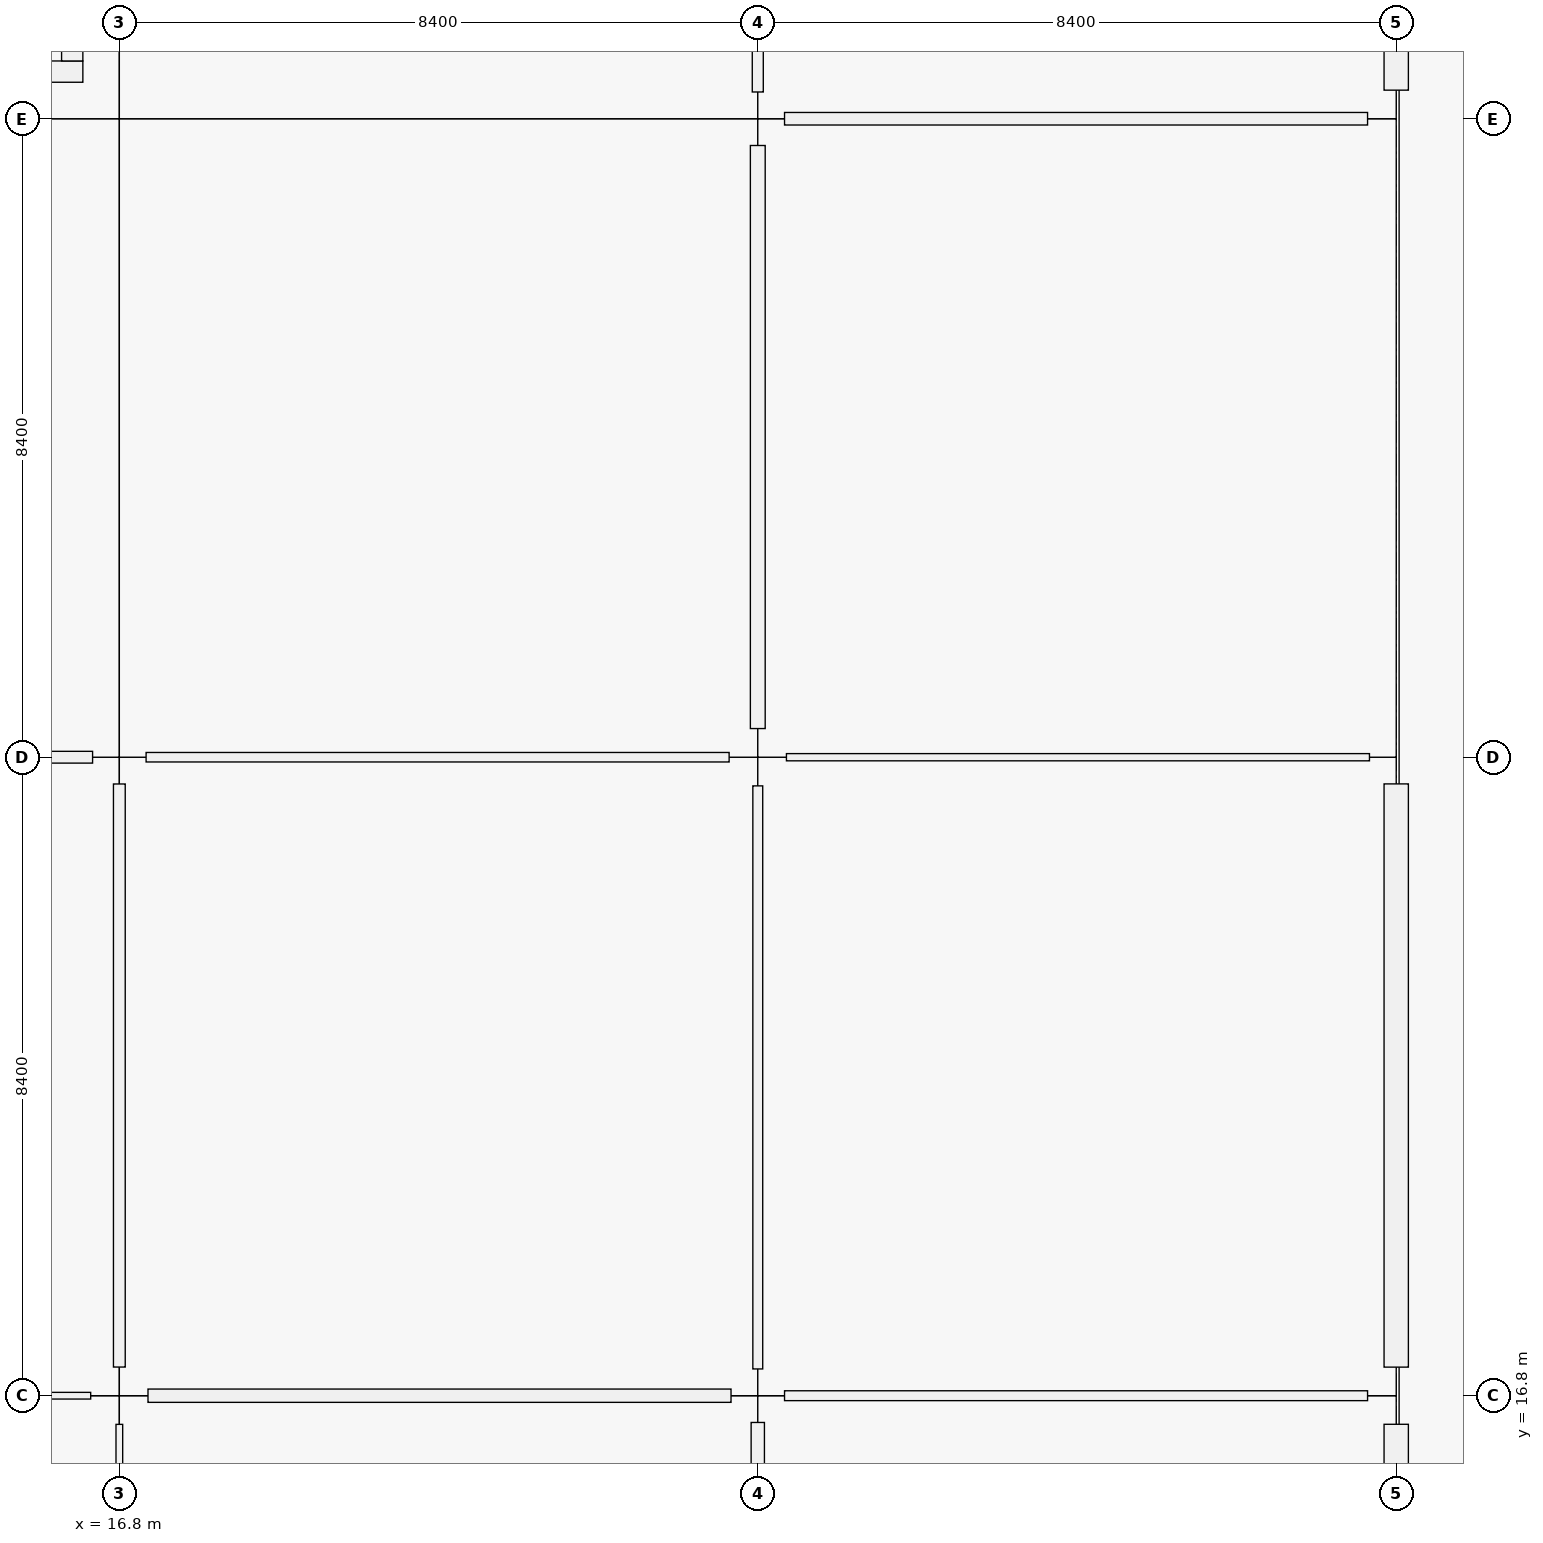
"""IFC4 building model, lengths in metres.
Left out: names, types, materials, properties, quantities, classifications, styles, units other than length and angle.
Written with IfcOpenShell. Run it as: python <this file> out.ifc"""

import sys

from ifc_helpers import new_model, si_unit, direction, frame, frame_2d, origin, origin_2d, place, context, subcontext, project, spatial, rectangle, extrude, element, fill, save


model = new_model("IFC4")
c1 = context("Model", 3, precision=1e-05, world=origin(), true_north=direction((0.0, 1.0)))
c2 = subcontext(c1, "Body", "Model", "MODEL_VIEW")
j1 = project(units=[si_unit("LENGTHUNIT", "METRE"), si_unit("PLANEANGLEUNIT", "RADIAN")], contexts=[c1])
p1 = place(None, origin())
s1 = spatial("IfcSite", under=j1, at=p1, CompositionType="ELEMENT")
p2 = place(p1, origin())
s2 = spatial("IfcBuilding", under=s1, at=p2, CompositionType="ELEMENT")
p3 = place(p2, frame((0.0, 0.0, 10.26)))
s3 = spatial("IfcBuildingStorey", under=s2, at=p3, CompositionType="ELEMENT", Elevation=10.26)
p4 = place(p3, frame((16.8, 16.8, 0.0), z_axis=(0.0, 0.0, 1.0), x_axis=(1.0, 0.0, 0.0)))
e1 = element("IfcColumn", 1, at=p4, inside=s3, PredefinedType="COLUMN", context=c2, shape_type="SweptSolid", body=[
    extrude(rectangle(XDim=0.75, YDim=0.75, at=origin_2d()), origin(), (0.0, 0.0, 1.0), 4.5),
])
p5 = place(p3, frame((16.8, 25.2, 0.0), z_axis=(0.0, 0.0, 1.0), x_axis=(1.0, 0.0, 0.0)))
e2 = element("IfcColumn", 2, at=p5, inside=s3, PredefinedType="COLUMN", context=c2, shape_type="SweptSolid", body=[
    extrude(rectangle(XDim=0.7, YDim=0.7, at=origin_2d()), origin(), (0.0, 0.0, 1.0), 4.5),
])
p6 = place(p3, frame((16.8, 33.6, 0.0), z_axis=(0.0, 0.0, 1.0), x_axis=(1.0, 0.0, 0.0)))
e3 = element("IfcColumn", 3, at=p6, inside=s3, PredefinedType="COLUMN", context=c2, shape_type="SweptSolid", body=[
    extrude(rectangle(XDim=0.75, YDim=0.75, at=origin_2d()), origin(), (0.0, 0.0, 1.0), 4.5),
])
p7 = place(p3, frame((25.2, 16.8, 0.0), z_axis=(0.0, 0.0, 1.0), x_axis=(1.0, 0.0, 0.0)))
e4 = element("IfcColumn", 4, at=p7, inside=s3, PredefinedType="COLUMN", context=c2, shape_type="SweptSolid", body=[
    extrude(rectangle(XDim=0.7, YDim=0.7, at=origin_2d()), origin(), (0.0, 0.0, 1.0), 4.5),
])
p8 = place(p3, frame((25.2, 25.2, 0.0), z_axis=(0.0, 0.0, 1.0), x_axis=(1.0, 0.0, 0.0)))
e5 = element("IfcColumn", 5, at=p8, inside=s3, PredefinedType="COLUMN", context=c2, shape_type="SweptSolid", body=[
    extrude(rectangle(XDim=0.75, YDim=0.75, at=origin_2d()), origin(), (0.0, 0.0, 1.0), 4.5),
])
p9 = place(p3, frame((25.2, 33.6, 0.0), z_axis=(0.0, 0.0, 1.0), x_axis=(1.0, 0.0, 0.0)))
e6 = element("IfcColumn", 6, at=p9, inside=s3, PredefinedType="COLUMN", context=c2, shape_type="SweptSolid", body=[
    extrude(rectangle(XDim=0.7, YDim=0.7, at=origin_2d()), origin(), (0.0, 0.0, 1.0), 4.5),
])
p10 = place(p3, frame((33.6, 16.8, 0.0), z_axis=(0.0, 0.0, 1.0), x_axis=(1.0, 0.0, 0.0)))
e7 = element("IfcColumn", 7, at=p10, inside=s3, PredefinedType="COLUMN", context=c2, shape_type="SweptSolid", body=[
    extrude(rectangle(XDim=0.75, YDim=0.75, at=origin_2d()), origin(), (0.0, 0.0, 1.0), 4.5),
])
p11 = place(p3, frame((33.6, 25.2, 0.0), z_axis=(0.0, 0.0, 1.0), x_axis=(1.0, 0.0, 0.0)))
e8 = element("IfcColumn", 8, at=p11, inside=s3, PredefinedType="COLUMN", context=c2, shape_type="SweptSolid", body=[
    extrude(rectangle(XDim=0.7, YDim=0.7, at=origin_2d()), origin(), (0.0, 0.0, 1.0), 4.5),
])
p12 = place(p3, frame((33.6, 33.6, 0.0), z_axis=(0.0, 0.0, 1.0), x_axis=(1.0, 0.0, 0.0)))
e9 = element("IfcColumn", 9, at=p12, inside=s3, PredefinedType="COLUMN", context=c2, shape_type="SweptSolid", body=[
    extrude(rectangle(XDim=0.75, YDim=0.75, at=origin_2d()), origin(), (0.0, 0.0, 1.0), 4.5),
])
p13 = place(p3, frame((33.6, 16.424, 0.0), z_axis=(0.0, 0.0, 1.0), x_axis=(0.0, -1.0, 0.0)))
e10 = element("IfcWall", 10, at=p13, inside=s3, PredefinedType="SOLIDWALL", context=c2, shape_type="SweptSolid", body=[
    extrude(rectangle(XDim=7.748, YDim=0.32, at=frame_2d((3.874, 0.0))), origin(), (0.0, 0.0, 1.0), 3.54),
])
p14 = place(p13, frame((3.074, 0.0, 0.9)))
e11 = element("IfcOpeningElement", 11, at=p14, cuts=e10, PredefinedType="OPENING", context=c2, shape_type="SweptSolid", body=[
    extrude(rectangle(XDim=1.6, YDim=2.1, at=frame_2d((0.8, 1.05))), frame((0.0, 0.16, 0.0), z_axis=(0.0, -1.0, 0.0), x_axis=(1.0, 0.0, 0.0)), (0.0, 0.0, 1.0), 0.32),
])
p15 = place(p3, frame((33.6, 24.849, 0.0), z_axis=(0.0, 0.0, 1.0), x_axis=(0.0, -1.0, 0.0)))
e12 = element("IfcWall", 12, at=p15, inside=s3, PredefinedType="SOLIDWALL", context=c2, shape_type="SweptSolid", body=[
    extrude(rectangle(XDim=7.673, YDim=0.32, at=frame_2d((3.836, 0.0))), origin(), (0.0, 0.0, 1.0), 3.54),
])
p16 = place(p15, frame((2.837, 0.0, 0.9)))
e13 = element("IfcOpeningElement", 13, at=p16, cuts=e12, PredefinedType="OPENING", context=c2, shape_type="SweptSolid", body=[
    extrude(rectangle(XDim=2.0, YDim=2.1, at=frame_2d((1.0, 1.05))), frame((0.0, 0.16, 0.0), z_axis=(0.0, -1.0, 0.0), x_axis=(1.0, 0.0, 0.0)), (0.0, 0.0, 1.0), 0.32),
])
p17 = place(p3, frame((33.6, 41.649, 0.0), z_axis=(0.0, 0.0, 1.0), x_axis=(0.0, -1.0, 0.0)))
e14 = element("IfcWall", 14, at=p17, inside=s3, PredefinedType="SOLIDWALL", context=c2, shape_type="SweptSolid", body=[
    extrude(rectangle(XDim=7.673, YDim=0.32, at=frame_2d((3.836, 0.0))), origin(), (0.0, 0.0, 1.0), 3.54),
])
p18 = place(p17, frame((2.537, 0.0, 0.9)))
e15 = element("IfcOpeningElement", 15, at=p18, cuts=e14, PredefinedType="OPENING", context=c2, shape_type="SweptSolid", body=[
    extrude(rectangle(XDim=2.6, YDim=2.1, at=frame_2d((1.3, 1.05))), frame((0.0, 0.16, 0.0), z_axis=(0.0, -1.0, 0.0), x_axis=(1.0, 0.0, 0.0)), (0.0, 0.0, 1.0), 0.32),
])
p19 = place(p3, frame((16.32, 34.22, 0.0), z_axis=(0.0, 0.0, 1.0), x_axis=(-1.0, 0.0, 0.0)))
e16 = element("IfcWall", 16, at=p19, inside=s3, PredefinedType="SHEAR", context=c2, shape_type="SweptSolid", body=[
    extrude(rectangle(XDim=7.44, YDim=0.28, at=frame_2d((3.72, 0.0))), origin(), (0.0, 0.0, 1.0), 4.5),
])
p20 = place(p19, frame((1.28, 0.0, 0.0)))
e17 = element("IfcOpeningElement", 17, at=p20, cuts=e16, PredefinedType="OPENING", context=c2, shape_type="SweptSolid", body=[
    extrude(rectangle(XDim=1.5, YDim=2.15, at=frame_2d((0.75, 1.075))), frame((0.0, 0.14, 0.0), z_axis=(0.0, -1.0, 0.0), x_axis=(1.0, 0.0, 0.0)), (0.0, 0.0, 1.0), 0.28),
])
p21 = place(p3, frame((16.18, 41.24, 0.0), z_axis=(0.0, 0.0, 1.0), x_axis=(0.0, -1.0, 0.0)))
e18 = element("IfcWall", 18, at=p21, inside=s3, PredefinedType="SHEAR", context=c2, shape_type="SweptSolid", body=[
    extrude(rectangle(XDim=6.88, YDim=0.28, at=frame_2d((3.44, 0.0))), origin(), (0.0, 0.0, 1.0), 4.5),
])
p22 = place(p3, frame((8.752, 16.8, 0.0), z_axis=(0.0, 0.0, 1.0), x_axis=(1.0, 0.0, 0.0)))
e19 = element("IfcWall", 19, at=p22, inside=s3, PredefinedType="PARTITIONING", context=c2, shape_type="SweptSolid", body=[
    extrude(rectangle(XDim=7.671, YDim=0.088, at=frame_2d((3.835, 0.0))), origin(), (0.0, 0.0, 1.0), 3.37),
])
p23 = place(p22, frame((3.351, 0.0, 0.0)))
e20 = element("IfcOpeningElement", 20, at=p23, cuts=e19, PredefinedType="OPENING", context=c2, shape_type="SweptSolid", body=[
    extrude(rectangle(XDim=0.97, YDim=2.12, at=frame_2d((0.485, 1.06))), frame((0.0, 0.044, 0.0), z_axis=(0.0, -1.0, 0.0), x_axis=(1.0, 0.0, 0.0)), (0.0, 0.0, 1.0), 0.088),
])
p24 = place(p3, frame((8.777, 25.2, 0.0), z_axis=(0.0, 0.0, 1.0), x_axis=(1.0, 0.0, 0.0)))
e21 = element("IfcWall", 21, at=p24, inside=s3, PredefinedType="PARTITIONING", context=c2, shape_type="SweptSolid", body=[
    extrude(rectangle(XDim=7.671, YDim=0.155, at=frame_2d((3.835, 0.0))), origin(), (0.0, 0.0, 1.0), 3.37),
])
p25 = place(p24, frame((3.371, 0.0, 0.0)))
e22 = element("IfcOpeningElement", 22, at=p25, cuts=e21, PredefinedType="OPENING", context=c2, shape_type="SweptSolid", body=[
    extrude(rectangle(XDim=0.93, YDim=2.12, at=frame_2d((0.465, 1.06))), frame((0.0, 0.078, 0.0), z_axis=(0.0, -1.0, 0.0), x_axis=(1.0, 0.0, 0.0)), (0.0, 0.0, 1.0), 0.155),
])
p26 = place(p3, frame((17.177, 16.8, 0.0), z_axis=(0.0, 0.0, 1.0), x_axis=(1.0, 0.0, 0.0)))
e23 = element("IfcWall", 23, at=p26, inside=s3, PredefinedType="PARTITIONING", context=c2, shape_type="SweptSolid", body=[
    extrude(rectangle(XDim=7.671, YDim=0.175, at=frame_2d((3.835, 0.0))), origin(), (0.0, 0.0, 1.0), 3.37),
])
p27 = place(p26, frame((3.371, 0.0, 0.0)))
e24 = element("IfcOpeningElement", 24, at=p27, cuts=e23, PredefinedType="OPENING", context=c2, shape_type="SweptSolid", body=[
    extrude(rectangle(XDim=0.93, YDim=2.12, at=frame_2d((0.465, 1.06))), frame((0.0, 0.087, 0.0), z_axis=(0.0, -1.0, 0.0), x_axis=(1.0, 0.0, 0.0)), (0.0, 0.0, 1.0), 0.175),
])
p28 = place(p3, frame((17.152, 25.2, 0.0), z_axis=(0.0, 0.0, 1.0), x_axis=(1.0, 0.0, 0.0)))
e25 = element("IfcWall", 25, at=p28, inside=s3, PredefinedType="PARTITIONING", context=c2, shape_type="SweptSolid", body=[
    extrude(rectangle(XDim=7.671, YDim=0.125, at=frame_2d((3.835, 0.0))), origin(), (0.0, 0.0, 1.0), 3.37),
])
p29 = place(p28, frame((3.306, 0.0, 0.0)))
e26 = element("IfcOpeningElement", 26, at=p29, cuts=e25, PredefinedType="OPENING", context=c2, shape_type="SweptSolid", body=[
    extrude(rectangle(XDim=1.06, YDim=2.25, at=frame_2d((0.53, 1.125))), frame((0.0, 0.062, 0.0), z_axis=(0.0, -1.0, 0.0), x_axis=(1.0, 0.0, 0.0)), (0.0, 0.0, 1.0), 0.125),
])
p30 = place(p3, frame((25.552, 16.8, 0.0), z_axis=(0.0, 0.0, 1.0), x_axis=(1.0, 0.0, 0.0)))
e27 = element("IfcWall", 27, at=p30, inside=s3, PredefinedType="MOVABLE", context=c2, shape_type="SweptSolid", body=[
    extrude(rectangle(XDim=7.671, YDim=0.13, at=frame_2d((3.835, 0.0))), origin(), (0.0, 0.0, 1.0), 3.37),
])
p31 = place(p30, frame((3.296, 0.0, 0.0)))
e28 = element("IfcOpeningElement", 28, at=p31, cuts=e27, PredefinedType="OPENING", context=c2, shape_type="SweptSolid", body=[
    extrude(rectangle(XDim=1.08, YDim=2.25, at=frame_2d((0.54, 1.125))), frame((0.0, 0.065, 0.0), z_axis=(0.0, -1.0, 0.0), x_axis=(1.0, 0.0, 0.0)), (0.0, 0.0, 1.0), 0.13),
])
p32 = place(p3, frame((25.577, 25.2, 0.0), z_axis=(0.0, 0.0, 1.0), x_axis=(1.0, 0.0, 0.0)))
e29 = element("IfcWall", 29, at=p32, inside=s3, PredefinedType="PARTITIONING", context=c2, shape_type="SweptSolid", body=[
    extrude(rectangle(XDim=7.671, YDim=0.095, at=frame_2d((3.835, 0.0))), origin(), (0.0, 0.0, 1.0), 3.37),
])
p33 = place(p32, frame((3.325, 0.0, 0.0)))
e30 = element("IfcOpeningElement", 30, at=p33, cuts=e29, PredefinedType="OPENING", context=c2, shape_type="SweptSolid", body=[
    extrude(rectangle(XDim=1.02, YDim=2.2, at=frame_2d((0.51, 1.1))), frame((0.0, 0.047, 0.0), z_axis=(0.0, -1.0, 0.0), x_axis=(1.0, 0.0, 0.0)), (0.0, 0.0, 1.0), 0.095),
])
p34 = place(p3, frame((25.552, 33.6, 0.0), z_axis=(0.0, 0.0, 1.0), x_axis=(1.0, 0.0, 0.0)))
e31 = element("IfcWall", 31, at=p34, inside=s3, PredefinedType="PARTITIONING", context=c2, shape_type="SweptSolid", body=[
    extrude(rectangle(XDim=7.671, YDim=0.165, at=frame_2d((3.835, 0.0))), origin(), (0.0, 0.0, 1.0), 3.37),
])
p35 = place(p34, frame((3.371, 0.0, 0.0)))
e32 = element("IfcOpeningElement", 32, at=p35, cuts=e31, PredefinedType="OPENING", context=c2, shape_type="SweptSolid", body=[
    extrude(rectangle(XDim=0.93, YDim=2.12, at=frame_2d((0.465, 1.06))), frame((0.0, 0.083, 0.0), z_axis=(0.0, -1.0, 0.0), x_axis=(1.0, 0.0, 0.0)), (0.0, 0.0, 1.0), 0.165),
])
p36 = place(p3, frame((16.8, 8.677, 0.0), z_axis=(0.0, 0.0, 1.0), x_axis=(0.0, 1.0, 0.0)))
e33 = element("IfcWall", 33, at=p36, inside=s3, PredefinedType="PARTITIONING", context=c2, shape_type="SweptSolid", body=[
    extrude(rectangle(XDim=7.746, YDim=0.088, at=frame_2d((3.873, 0.0))), origin(), (0.0, 0.0, 1.0), 3.37),
])
p37 = place(p36, frame((3.353, 0.0, 0.0)))
e34 = element("IfcOpeningElement", 34, at=p37, cuts=e33, PredefinedType="OPENING", context=c2, shape_type="SweptSolid", body=[
    extrude(rectangle(XDim=1.04, YDim=2.2, at=frame_2d((0.52, 1.1))), frame((0.0, 0.044, 0.0), z_axis=(0.0, -1.0, 0.0), x_axis=(1.0, 0.0, 0.0)), (0.0, 0.0, 1.0), 0.088),
])
p38 = place(p3, frame((16.8, 17.177, 0.0), z_axis=(0.0, 0.0, 1.0), x_axis=(0.0, 1.0, 0.0)))
e35 = element("IfcWall", 35, at=p38, inside=s3, PredefinedType="PARTITIONING", context=c2, shape_type="SweptSolid", body=[
    extrude(rectangle(XDim=7.671, YDim=0.155, at=frame_2d((3.835, 0.0))), origin(), (0.0, 0.0, 1.0), 3.37),
])
p39 = place(p38, frame((3.325, 0.0, 0.0)))
e36 = element("IfcOpeningElement", 36, at=p39, cuts=e35, PredefinedType="OPENING", context=c2, shape_type="SweptSolid", body=[
    extrude(rectangle(XDim=1.02, YDim=2.2, at=frame_2d((0.51, 1.1))), frame((0.0, 0.078, 0.0), z_axis=(0.0, -1.0, 0.0), x_axis=(1.0, 0.0, 0.0)), (0.0, 0.0, 1.0), 0.155),
])
p40 = place(p3, frame((25.2, 8.677, 0.0), z_axis=(0.0, 0.0, 1.0), x_axis=(0.0, 1.0, 0.0)))
e37 = element("IfcWall", 37, at=p40, inside=s3, PredefinedType="PARTITIONING", context=c2, shape_type="SweptSolid", body=[
    extrude(rectangle(XDim=7.771, YDim=0.175, at=frame_2d((3.885, 0.0))), origin(), (0.0, 0.0, 1.0), 3.37),
])
p41 = place(p40, frame((3.385, 0.0, 0.0)))
e38 = element("IfcOpeningElement", 38, at=p41, cuts=e37, PredefinedType="OPENING", context=c2, shape_type="SweptSolid", body=[
    extrude(rectangle(XDim=1.0, YDim=2.2, at=frame_2d((0.5, 1.1))), frame((0.0, 0.087, 0.0), z_axis=(0.0, -1.0, 0.0), x_axis=(1.0, 0.0, 0.0)), (0.0, 0.0, 1.0), 0.175),
])
p42 = place(p3, frame((25.2, 17.152, 0.0), z_axis=(0.0, 0.0, 1.0), x_axis=(0.0, 1.0, 0.0)))
e39 = element("IfcWall", 39, at=p42, inside=s3, PredefinedType="MOVABLE", context=c2, shape_type="SweptSolid", body=[
    extrude(rectangle(XDim=7.671, YDim=0.13, at=frame_2d((3.835, 0.0))), origin(), (0.0, 0.0, 1.0), 3.37),
])
p43 = place(p42, frame((3.346, 0.0, 0.0)))
e40 = element("IfcOpeningElement", 40, at=p43, cuts=e39, PredefinedType="OPENING", context=c2, shape_type="SweptSolid", body=[
    extrude(rectangle(XDim=0.98, YDim=2.18, at=frame_2d((0.49, 1.09))), frame((0.0, 0.065, 0.0), z_axis=(0.0, -1.0, 0.0), x_axis=(1.0, 0.0, 0.0)), (0.0, 0.0, 1.0), 0.13),
])
p44 = place(p3, frame((25.2, 25.577, 0.0), z_axis=(0.0, 0.0, 1.0), x_axis=(0.0, 1.0, 0.0)))
e41 = element("IfcWall", 41, at=p44, inside=s3, PredefinedType="PARTITIONING", context=c2, shape_type="SweptSolid", body=[
    extrude(rectangle(XDim=7.671, YDim=0.195, at=frame_2d((3.835, 0.0))), origin(), (0.0, 0.0, 1.0), 3.37),
])
p45 = place(p44, frame((3.371, 0.0, 0.0)))
e42 = element("IfcOpeningElement", 42, at=p45, cuts=e41, PredefinedType="OPENING", context=c2, shape_type="SweptSolid", body=[
    extrude(rectangle(XDim=0.93, YDim=2.12, at=frame_2d((0.465, 1.06))), frame((0.0, 0.098, 0.0), z_axis=(0.0, -1.0, 0.0), x_axis=(1.0, 0.0, 0.0)), (0.0, 0.0, 1.0), 0.195),
])
p46 = place(p3, frame((25.2, 33.952, 0.0), z_axis=(0.0, 0.0, 1.0), x_axis=(0.0, 1.0, 0.0)))
e43 = element("IfcWall", 43, at=p46, inside=s3, PredefinedType="PARTITIONING", context=c2, shape_type="SweptSolid", body=[
    extrude(rectangle(XDim=7.671, YDim=0.145, at=frame_2d((3.835, 0.0))), origin(), (0.0, 0.0, 1.0), 3.37),
])
p47 = place(p46, frame((3.296, 0.0, 0.0)))
e44 = element("IfcOpeningElement", 44, at=p47, cuts=e43, PredefinedType="OPENING", context=c2, shape_type="SweptSolid", body=[
    extrude(rectangle(XDim=1.08, YDim=2.25, at=frame_2d((0.54, 1.125))), frame((0.0, 0.073, 0.0), z_axis=(0.0, -1.0, 0.0), x_axis=(1.0, 0.0, 0.0)), (0.0, 0.0, 1.0), 0.145),
])
p48 = place(p16, origin())
e45 = element("IfcWindow", 45, at=p48, inside=s3, PartitioningType="SINGLE_PANEL", PredefinedType="WINDOW", context=c2, shape_type="SweptSolid", body=[
    extrude(rectangle(XDim=2.0, YDim=2.1, at=frame_2d((1.0, 1.05))), frame((0.0, 0.03, 0.0), z_axis=(0.0, -1.0, 0.0), x_axis=(1.0, 0.0, 0.0)), (0.0, 0.0, 1.0), 0.06),
])
fill(e13, e45)
p49 = place(p29, origin())
e46 = element("IfcDoor", 46, at=p49, inside=s3, OperationType="SINGLE_SWING_RIGHT", PredefinedType="DOOR", context=c2, shape_type="SweptSolid", body=[
    extrude(rectangle(XDim=1.06, YDim=2.25, at=frame_2d((0.53, 1.125))), frame((0.0, 0.025, 0.0), z_axis=(0.0, -1.0, 0.0), x_axis=(1.0, 0.0, 0.0)), (0.0, 0.0, 1.0), 0.05),
])
fill(e26, e46)
p50 = place(p45, origin())
e47 = element("IfcDoor", 47, at=p50, inside=s3, OperationType="SINGLE_SWING_LEFT", PredefinedType="DOOR", context=c2, shape_type="SweptSolid", body=[
    extrude(rectangle(XDim=0.93, YDim=2.12, at=frame_2d((0.465, 1.06))), frame((0.0, 0.025, 0.0), z_axis=(0.0, -1.0, 0.0), x_axis=(1.0, 0.0, 0.0)), (0.0, 0.0, 1.0), 0.05),
])
fill(e42, e47)
p51 = place(p27, origin())
e48 = element("IfcDoor", 48, at=p51, inside=s3, OperationType="SINGLE_SWING_LEFT", PredefinedType="DOOR", context=c2, shape_type="SweptSolid", body=[
    extrude(rectangle(XDim=0.93, YDim=2.12, at=frame_2d((0.465, 1.06))), frame((0.0, 0.025, 0.0), z_axis=(0.0, -1.0, 0.0), x_axis=(1.0, 0.0, 0.0)), (0.0, 0.0, 1.0), 0.05),
])
fill(e24, e48)
p52 = place(p31, origin())
e49 = element("IfcDoor", 49, at=p52, inside=s3, OperationType="SINGLE_SWING_RIGHT", PredefinedType="DOOR", context=c2, shape_type="SweptSolid", body=[
    extrude(rectangle(XDim=1.08, YDim=2.25, at=frame_2d((0.54, 1.125))), frame((0.0, 0.025, 0.0), z_axis=(0.0, -1.0, 0.0), x_axis=(1.0, 0.0, 0.0)), (0.0, 0.0, 1.0), 0.05),
])
fill(e28, e49)
p53 = place(p33, origin())
e50 = element("IfcDoor", 50, at=p53, inside=s3, OperationType="SINGLE_SWING_RIGHT", PredefinedType="DOOR", context=c2, shape_type="SweptSolid", body=[
    extrude(rectangle(XDim=1.02, YDim=2.2, at=frame_2d((0.51, 1.1))), frame((0.0, 0.025, 0.0), z_axis=(0.0, -1.0, 0.0), x_axis=(1.0, 0.0, 0.0)), (0.0, 0.0, 1.0), 0.05),
])
fill(e30, e50)
p54 = place(p35, origin())
e51 = element("IfcDoor", 51, at=p54, inside=s3, OperationType="SINGLE_SWING_LEFT", PredefinedType="DOOR", context=c2, shape_type="SweptSolid", body=[
    extrude(rectangle(XDim=0.93, YDim=2.12, at=frame_2d((0.465, 1.06))), frame((0.0, 0.025, 0.0), z_axis=(0.0, -1.0, 0.0), x_axis=(1.0, 0.0, 0.0)), (0.0, 0.0, 1.0), 0.05),
])
fill(e32, e51)
p55 = place(p39, origin())
e52 = element("IfcDoor", 52, at=p55, inside=s3, OperationType="SINGLE_SWING_LEFT", PredefinedType="DOOR", context=c2, shape_type="SweptSolid", body=[
    extrude(rectangle(XDim=1.02, YDim=2.2, at=frame_2d((0.51, 1.1))), frame((0.0, 0.025, 0.0), z_axis=(0.0, -1.0, 0.0), x_axis=(1.0, 0.0, 0.0)), (0.0, 0.0, 1.0), 0.05),
])
fill(e36, e52)
p56 = place(p43, origin())
e53 = element("IfcDoor", 53, at=p56, inside=s3, OperationType="SINGLE_SWING_LEFT", PredefinedType="DOOR", context=c2, shape_type="SweptSolid", body=[
    extrude(rectangle(XDim=0.98, YDim=2.18, at=frame_2d((0.49, 1.09))), frame((0.0, 0.025, 0.0), z_axis=(0.0, -1.0, 0.0), x_axis=(1.0, 0.0, 0.0)), (0.0, 0.0, 1.0), 0.05),
])
fill(e40, e53)
save(model, sys.argv[1])
